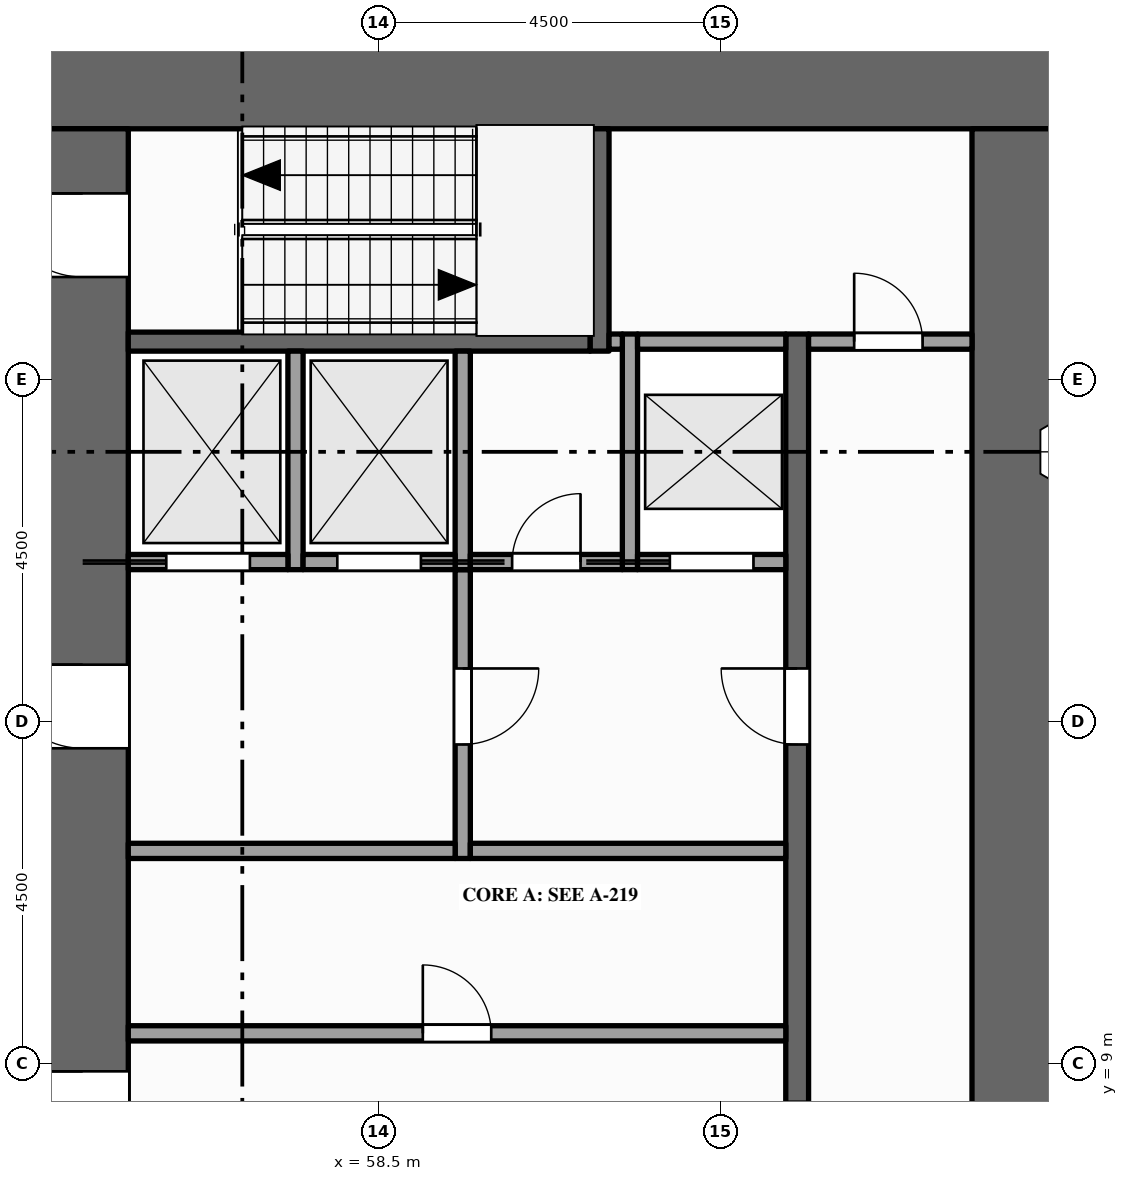
"""IFC4 building model, lengths in metres.
Left out: names, types, materials, properties, quantities, classifications, styles, units other than length and angle.
Written with IfcOpenShell. Run it as: python <this file> out.ifc"""

import sys

from ifc_helpers import new_model, si_unit, direction, frame, frame_2d, origin, place, context, subcontext, project, spatial, rectangle, extrude, element, fill, save


model = new_model("IFC4")
c1 = context("Model", 3, precision=1e-05, world=origin(), true_north=direction((0.0, 1.0)))
c2 = subcontext(c1, "Body", "Model", "MODEL_VIEW")
j1 = project(units=[si_unit("LENGTHUNIT", "METRE"), si_unit("PLANEANGLEUNIT", "RADIAN")], contexts=[c1])
p1 = place(None, origin())
s1 = spatial("IfcSite", under=j1, at=p1, CompositionType="ELEMENT")
p2 = place(p1, origin())
s2 = spatial("IfcBuilding", under=s1, at=p2, CompositionType="ELEMENT")
p3 = place(p2, frame((0.0, 0.0, 107.0)))
s3 = spatial("IfcBuildingStorey", under=s2, at=p3, CompositionType="ELEMENT", Elevation=107.0)
p4 = place(p3, frame((54.0, 21.9, -0.15), z_axis=(0.0, 0.0, 1.0), x_axis=(1.0, 0.0, 0.0)))
e1 = element("IfcWall", 1, at=p4, inside=s3, PredefinedType="SHEAR", context=c2, shape_type="SweptSolid", body=[
    extrude(rectangle(XDim=13.5, YDim=1.2, at=frame_2d((6.75, 0.0))), origin(), (0.0, 0.0, 1.0), 4.0),
])
p5 = place(p3, frame((54.6, 1.2, -0.15), z_axis=(0.0, 0.0, 1.0), x_axis=(0.0, 1.0, 0.0)))
e2 = element("IfcWall", 2, at=p5, inside=s3, PredefinedType="SHEAR", context=c2, shape_type="SweptSolid", body=[
    extrude(rectangle(XDim=20.1, YDim=1.2, at=frame_2d((10.05, 0.0))), origin(), (0.0, 0.0, 1.0), 4.0),
])
p6 = place(p5, frame((5.9, 0.0, 0.15)))
e3 = element("IfcOpeningElement", 3, at=p6, cuts=e2, PredefinedType="OPENING", context=c2, shape_type="SweptSolid", body=[
    extrude(rectangle(XDim=1.8, YDim=2.1, at=frame_2d((0.9, 1.05))), frame((0.0, 0.61, 0.0), z_axis=(0.0, -1.0, 0.0), x_axis=(1.0, 0.0, 0.0)), (0.0, 0.0, 1.0), 1.22),
])
p7 = place(p5, frame((11.95, 0.0, 0.15)))
e4 = element("IfcOpeningElement", 4, at=p7, cuts=e2, PredefinedType="OPENING", context=c2, shape_type="SweptSolid", body=[
    extrude(rectangle(XDim=1.1, YDim=2.1, at=frame_2d((0.55, 1.05))), frame((0.0, 0.61, 0.0), z_axis=(0.0, -1.0, 0.0), x_axis=(1.0, 0.0, 0.0)), (0.0, 0.0, 1.0), 1.22),
])
p8 = place(p5, frame((0.95, 0.0, 0.15)))
e5 = element("IfcOpeningElement", 5, at=p8, cuts=e2, PredefinedType="OPENING", context=c2, shape_type="SweptSolid", body=[
    extrude(rectangle(XDim=1.1, YDim=2.1, at=frame_2d((0.55, 1.05))), frame((0.0, 0.61, 0.0), z_axis=(0.0, -1.0, 0.0), x_axis=(1.0, 0.0, 0.0)), (0.0, 0.0, 1.0), 1.22),
])
p9 = place(p5, frame((18.15, 0.0, 0.15)))
e6 = element("IfcOpeningElement", 6, at=p9, cuts=e2, PredefinedType="OPENING", context=c2, shape_type="SweptSolid", body=[
    extrude(rectangle(XDim=1.1, YDim=2.1, at=frame_2d((0.55, 1.05))), frame((0.0, 0.61, 0.0), z_axis=(0.0, -1.0, 0.0), x_axis=(1.0, 0.0, 0.0)), (0.0, 0.0, 1.0), 1.22),
])
p10 = place(p3, frame((66.9, 1.2, -0.15), z_axis=(0.0, 0.0, 1.0), x_axis=(0.0, 1.0, 0.0)))
e7 = element("IfcWall", 7, at=p10, inside=s3, PredefinedType="SHEAR", context=c2, shape_type="SweptSolid", body=[
    extrude(rectangle(XDim=20.1, YDim=1.2, at=frame_2d((10.05, 0.0))), origin(), (0.0, 0.0, 1.0), 4.0),
])
p11 = place(p3, frame((57.4, 15.5, 0.0), z_axis=(0.0, 0.0, 1.0), x_axis=(0.0, 1.0, 0.0)))
e8 = element("IfcWall", 8, at=p11, inside=s3, PredefinedType="SOLIDWALL", context=c2, shape_type="SweptSolid", body=[
    extrude(rectangle(XDim=2.875, YDim=0.2, at=frame_2d((1.438, 0.0))), origin(), (0.0, 0.0, 1.0), 3.85),
])
p12 = place(p3, frame((59.6, 11.7, 0.0), z_axis=(0.0, 0.0, 1.0), x_axis=(0.0, 1.0, 0.0)))
e9 = element("IfcWall", 9, at=p12, inside=s3, PredefinedType="PARTITIONING", context=c2, shape_type="SweptSolid", body=[
    extrude(rectangle(XDim=3.8, YDim=0.2, at=frame_2d((1.9, 0.0))), origin(), (0.0, 0.0, 1.0), 3.85),
])
p13 = place(p12, frame((1.5, 0.0, 0.0)))
e10 = element("IfcOpeningElement", 10, at=p13, cuts=e9, PredefinedType="OPENING", context=c2, shape_type="SweptSolid", body=[
    extrude(rectangle(XDim=1.0, YDim=2.1, at=frame_2d((0.5, 1.05))), frame((0.0, 0.11, 0.0), z_axis=(0.0, -1.0, 0.0), x_axis=(1.0, 0.0, 0.0)), (0.0, 0.0, 1.0), 0.22),
])
p14 = place(p3, frame((59.6, 15.5, 0.0), z_axis=(0.0, 0.0, 1.0), x_axis=(0.0, 1.0, 0.0)))
e11 = element("IfcWall", 11, at=p14, inside=s3, PredefinedType="SOLIDWALL", context=c2, shape_type="SweptSolid", body=[
    extrude(rectangle(XDim=2.875, YDim=0.2, at=frame_2d((1.438, 0.0))), origin(), (0.0, 0.0, 1.0), 3.85),
])
p15 = place(p3, frame((61.4, 18.375, 0.0), z_axis=(0.0, 0.0, 1.0), x_axis=(0.0, 1.0, 0.0)))
e12 = element("IfcWall", 12, at=p15, inside=s3, PredefinedType="SHEAR", context=c2, shape_type="SweptSolid", body=[
    extrude(rectangle(XDim=2.925, YDim=0.25, at=frame_2d((1.462, 0.0))), origin(), (0.0, 0.0, 1.0), 3.85),
])
p16 = place(p3, frame((61.8, 15.5, 0.0), z_axis=(0.0, 0.0, 1.0), x_axis=(0.0, 1.0, 0.0)))
e13 = element("IfcWall", 13, at=p16, inside=s3, PredefinedType="SOLIDWALL", context=c2, shape_type="SweptSolid", body=[
    extrude(rectangle(XDim=3.1, YDim=0.2, at=frame_2d((1.55, 0.0))), origin(), (0.0, 0.0, 1.0), 3.85),
])
p17 = place(p3, frame((64.0, 4.1, 0.0), z_axis=(0.0, 0.0, 1.0), x_axis=(0.0, 1.0, 0.0)))
e14 = element("IfcWall", 14, at=p17, inside=s3, PredefinedType="SHEAR", context=c2, shape_type="SweptSolid", body=[
    extrude(rectangle(XDim=14.5, YDim=0.3, at=frame_2d((7.25, 0.0))), origin(), (0.0, 0.0, 1.0), 3.85),
])
p18 = place(p17, frame((3.4, 0.0, 0.0)))
e15 = element("IfcOpeningElement", 15, at=p18, cuts=e14, PredefinedType="OPENING", context=c2, shape_type="SweptSolid", body=[
    extrude(rectangle(XDim=1.0, YDim=2.1, at=frame_2d((0.5, 1.05))), frame((0.0, 0.16, 0.0), z_axis=(0.0, -1.0, 0.0), x_axis=(1.0, 0.0, 0.0)), (0.0, 0.0, 1.0), 0.32),
])
p19 = place(p17, frame((9.1, 0.0, 0.0)))
e16 = element("IfcOpeningElement", 16, at=p19, cuts=e14, PredefinedType="OPENING", context=c2, shape_type="SweptSolid", body=[
    extrude(rectangle(XDim=1.0, YDim=2.1, at=frame_2d((0.5, 1.05))), frame((0.0, 0.16, 0.0), z_axis=(0.0, -1.0, 0.0), x_axis=(1.0, 0.0, 0.0)), (0.0, 0.0, 1.0), 0.32),
])
p20 = place(p3, frame((55.2, 9.4, 0.0), z_axis=(0.0, 0.0, 1.0), x_axis=(1.0, 0.0, 0.0)))
e17 = element("IfcWall", 17, at=p20, inside=s3, PredefinedType="PARTITIONING", context=c2, shape_type="SweptSolid", body=[
    extrude(rectangle(XDim=8.65, YDim=0.2, at=frame_2d((4.325, 0.0))), origin(), (0.0, 0.0, 1.0), 3.85),
])
p21 = place(p20, frame((3.875, 0.0, 0.0)))
e18 = element("IfcOpeningElement", 18, at=p21, cuts=e17, PredefinedType="OPENING", context=c2, shape_type="SweptSolid", body=[
    extrude(rectangle(XDim=0.9, YDim=2.1, at=frame_2d((0.45, 1.05))), frame((0.0, 0.11, 0.0), z_axis=(0.0, -1.0, 0.0), x_axis=(1.0, 0.0, 0.0)), (0.0, 0.0, 1.0), 0.22),
])
p22 = place(p3, frame((55.2, 11.8, 0.0), z_axis=(0.0, 0.0, 1.0), x_axis=(1.0, 0.0, 0.0)))
e19 = element("IfcWall", 19, at=p22, inside=s3, PredefinedType="PARTITIONING", context=c2, shape_type="SweptSolid", body=[
    extrude(rectangle(XDim=4.3, YDim=0.2, at=frame_2d((2.15, 0.0))), origin(), (0.0, 0.0, 1.0), 3.85),
])
p23 = place(p3, frame((59.7, 11.8, 0.0), z_axis=(0.0, 0.0, 1.0), x_axis=(1.0, 0.0, 0.0)))
e20 = element("IfcWall", 20, at=p23, inside=s3, PredefinedType="PARTITIONING", context=c2, shape_type="SweptSolid", body=[
    extrude(rectangle(XDim=4.15, YDim=0.2, at=frame_2d((2.075, 0.0))), origin(), (0.0, 0.0, 1.0), 3.85),
])
p24 = place(p3, frame((55.2, 15.6, 0.0), z_axis=(0.0, 0.0, 1.0), x_axis=(1.0, 0.0, 0.0)))
e21 = element("IfcWall", 21, at=p24, inside=s3, PredefinedType="SOLIDWALL", context=c2, shape_type="SweptSolid", body=[
    extrude(rectangle(XDim=2.1, YDim=0.2, at=frame_2d((1.05, 0.0))), origin(), (0.0, 0.0, 1.0), 3.85),
])
p25 = place(p24, frame((0.5, 0.0, 0.012)))
e22 = element("IfcOpeningElement", 22, at=p25, cuts=e21, PredefinedType="OPENING", context=c2, shape_type="SweptSolid", body=[
    extrude(rectangle(XDim=1.1, YDim=2.1, at=frame_2d((0.55, 1.05))), frame((0.0, 0.11, 0.0), z_axis=(0.0, -1.0, 0.0), x_axis=(1.0, 0.0, 0.0)), (0.0, 0.0, 1.0), 0.22),
])
p26 = place(p3, frame((57.5, 15.6, 0.0), z_axis=(0.0, 0.0, 1.0), x_axis=(1.0, 0.0, 0.0)))
e23 = element("IfcWall", 23, at=p26, inside=s3, PredefinedType="SOLIDWALL", context=c2, shape_type="SweptSolid", body=[
    extrude(rectangle(XDim=2.0, YDim=0.2, at=frame_2d((1.0, 0.0))), origin(), (0.0, 0.0, 1.0), 3.85),
])
p27 = place(p26, frame((0.45, 0.0, 0.012)))
e24 = element("IfcOpeningElement", 24, at=p27, cuts=e23, PredefinedType="OPENING", context=c2, shape_type="SweptSolid", body=[
    extrude(rectangle(XDim=1.1, YDim=2.1, at=frame_2d((0.55, 1.05))), frame((0.0, 0.11, 0.0), z_axis=(0.0, -1.0, 0.0), x_axis=(1.0, 0.0, 0.0)), (0.0, 0.0, 1.0), 0.22),
])
p28 = place(p3, frame((59.7, 15.6, 0.0), z_axis=(0.0, 0.0, 1.0), x_axis=(1.0, 0.0, 0.0)))
e25 = element("IfcWall", 25, at=p28, inside=s3, PredefinedType="PARTITIONING", context=c2, shape_type="SweptSolid", body=[
    extrude(rectangle(XDim=2.0, YDim=0.2, at=frame_2d((1.0, 0.0))), origin(), (0.0, 0.0, 1.0), 3.85),
])
p29 = place(p28, frame((0.55, 0.0, 0.0)))
e26 = element("IfcOpeningElement", 26, at=p29, cuts=e25, PredefinedType="OPENING", context=c2, shape_type="SweptSolid", body=[
    extrude(rectangle(XDim=0.9, YDim=2.1, at=frame_2d((0.45, 1.05))), frame((0.0, 0.11, 0.0), z_axis=(0.0, -1.0, 0.0), x_axis=(1.0, 0.0, 0.0)), (0.0, 0.0, 1.0), 0.22),
])
p30 = place(p3, frame((61.9, 15.6, 0.0), z_axis=(0.0, 0.0, 1.0), x_axis=(1.0, 0.0, 0.0)))
e27 = element("IfcWall", 27, at=p30, inside=s3, PredefinedType="SOLIDWALL", context=c2, shape_type="SweptSolid", body=[
    extrude(rectangle(XDim=1.95, YDim=0.2, at=frame_2d((0.975, 0.0))), origin(), (0.0, 0.0, 1.0), 3.85),
])
p31 = place(p30, frame((0.425, 0.0, 0.012)))
e28 = element("IfcOpeningElement", 28, at=p31, cuts=e27, PredefinedType="OPENING", context=c2, shape_type="SweptSolid", body=[
    extrude(rectangle(XDim=1.1, YDim=2.1, at=frame_2d((0.55, 1.05))), frame((0.0, 0.11, 0.0), z_axis=(0.0, -1.0, 0.0), x_axis=(1.0, 0.0, 0.0)), (0.0, 0.0, 1.0), 0.22),
])
p32 = place(p3, frame((55.2, 18.5, 0.0), z_axis=(0.0, 0.0, 1.0), x_axis=(1.0, 0.0, 0.0)))
e29 = element("IfcWall", 29, at=p32, inside=s3, PredefinedType="SHEAR", context=c2, shape_type="SweptSolid", body=[
    extrude(rectangle(XDim=6.075, YDim=0.25, at=frame_2d((3.038, 0.0))), origin(), (0.0, 0.0, 1.0), 3.85),
])
p33 = place(p3, frame((61.525, 18.5, 0.0), z_axis=(0.0, 0.0, 1.0), x_axis=(1.0, 0.0, 0.0)))
e30 = element("IfcWall", 30, at=p33, inside=s3, PredefinedType="PARTITIONING", context=c2, shape_type="SweptSolid", body=[
    extrude(rectangle(XDim=0.175, YDim=0.2, at=frame_2d((0.087, 0.0))), origin(), (0.0, 0.0, 1.0), 3.85),
])
p34 = place(p3, frame((61.9, 18.5, 0.0), z_axis=(0.0, 0.0, 1.0), x_axis=(1.0, 0.0, 0.0)))
e31 = element("IfcWall", 31, at=p34, inside=s3, PredefinedType="SOLIDWALL", context=c2, shape_type="SweptSolid", body=[
    extrude(rectangle(XDim=1.95, YDim=0.2, at=frame_2d((0.975, 0.0))), origin(), (0.0, 0.0, 1.0), 3.85),
])
p35 = place(p3, frame((64.15, 18.5, 0.0), z_axis=(0.0, 0.0, 1.0), x_axis=(1.0, 0.0, 0.0)))
e32 = element("IfcWall", 32, at=p35, inside=s3, PredefinedType="PARTITIONING", context=c2, shape_type="SweptSolid", body=[
    extrude(rectangle(XDim=2.15, YDim=0.2, at=frame_2d((1.075, 0.0))), origin(), (0.0, 0.0, 1.0), 3.85),
])
p36 = place(p35, frame((0.6, 0.0, 0.0)))
e33 = element("IfcOpeningElement", 33, at=p36, cuts=e32, PredefinedType="OPENING", context=c2, shape_type="SweptSolid", body=[
    extrude(rectangle(XDim=0.9, YDim=2.1, at=frame_2d((0.45, 1.05))), frame((0.0, 0.11, 0.0), z_axis=(0.0, -1.0, 0.0), x_axis=(1.0, 0.0, 0.0)), (0.0, 0.0, 1.0), 0.22),
])
p37 = place(p25, origin())
e34 = element("IfcDoor", 34, at=p37, inside=s3, OperationType="SLIDING_TO_LEFT", PredefinedType="DOOR", context=c2, shape_type="SweptSolid", body=[
    extrude(rectangle(XDim=1.1, YDim=2.1, at=frame_2d((0.55, 1.05))), frame((0.0, 0.025, 0.0), z_axis=(0.0, -1.0, 0.0), x_axis=(1.0, 0.0, 0.0)), (0.0, 0.0, 1.0), 0.05),
])
fill(e22, e34)
p38 = place(p27, origin())
e35 = element("IfcDoor", 35, at=p38, inside=s3, OperationType="SLIDING_TO_RIGHT", PredefinedType="DOOR", context=c2, shape_type="SweptSolid", body=[
    extrude(rectangle(XDim=1.1, YDim=2.1, at=frame_2d((0.55, 1.05))), frame((0.0, 0.025, 0.0), z_axis=(0.0, -1.0, 0.0), x_axis=(1.0, 0.0, 0.0)), (0.0, 0.0, 1.0), 0.05),
])
fill(e24, e35)
p39 = place(p31, origin())
e36 = element("IfcDoor", 36, at=p39, inside=s3, OperationType="SLIDING_TO_LEFT", PredefinedType="DOOR", context=c2, shape_type="SweptSolid", body=[
    extrude(rectangle(XDim=1.1, YDim=2.1, at=frame_2d((0.55, 1.05))), frame((0.0, 0.025, 0.0), z_axis=(0.0, -1.0, 0.0), x_axis=(1.0, 0.0, 0.0)), (0.0, 0.0, 1.0), 0.05),
])
fill(e28, e36)
p40 = place(p6, origin())
e37 = element("IfcDoor", 37, at=p40, inside=s3, OperationType="DOUBLE_DOOR_SINGLE_SWING", PredefinedType="DOOR", context=c2, shape_type="SweptSolid", body=[
    extrude(rectangle(XDim=1.8, YDim=2.1, at=frame_2d((0.9, 1.05))), frame((0.0, 0.025, 0.0), z_axis=(0.0, -1.0, 0.0), x_axis=(1.0, 0.0, 0.0)), (0.0, 0.0, 1.0), 0.05),
])
fill(e3, e37)
p41 = place(p7, origin())
e38 = element("IfcDoor", 38, at=p41, inside=s3, OperationType="SINGLE_SWING_RIGHT", PredefinedType="DOOR", context=c2, shape_type="SweptSolid", body=[
    extrude(rectangle(XDim=1.1, YDim=2.1, at=frame_2d((0.55, 1.05))), frame((0.0, 0.025, 0.0), z_axis=(0.0, -1.0, 0.0), x_axis=(1.0, 0.0, 0.0)), (0.0, 0.0, 1.0), 0.05),
])
fill(e4, e38)
p42 = place(p13, origin())
e39 = element("IfcDoor", 39, at=p42, inside=s3, OperationType="SINGLE_SWING_RIGHT", PredefinedType="DOOR", context=c2, shape_type="SweptSolid", body=[
    extrude(rectangle(XDim=1.0, YDim=2.1, at=frame_2d((0.5, 1.05))), frame((0.0, 0.025, 0.0), z_axis=(0.0, -1.0, 0.0), x_axis=(1.0, 0.0, 0.0)), (0.0, 0.0, 1.0), 0.05),
])
fill(e10, e39)
p43 = place(p19, origin())
e40 = element("IfcDoor", 40, at=p43, inside=s3, OperationType="SINGLE_SWING_RIGHT", PredefinedType="DOOR", context=c2, shape_type="SweptSolid", body=[
    extrude(rectangle(XDim=1.0, YDim=2.1, at=frame_2d((0.5, 1.05))), frame((0.0, 0.025, 0.0), z_axis=(0.0, -1.0, 0.0), x_axis=(1.0, 0.0, 0.0)), (0.0, 0.0, 1.0), 0.05),
])
fill(e16, e40)
p44 = place(p9, origin())
e41 = element("IfcDoor", 41, at=p44, inside=s3, OperationType="SINGLE_SWING_RIGHT", PredefinedType="DOOR", context=c2, shape_type="SweptSolid", body=[
    extrude(rectangle(XDim=1.1, YDim=2.1, at=frame_2d((0.55, 1.05))), frame((0.0, 0.025, 0.0), z_axis=(0.0, -1.0, 0.0), x_axis=(1.0, 0.0, 0.0)), (0.0, 0.0, 1.0), 0.05),
])
fill(e6, e41)
p45 = place(p36, origin())
e42 = element("IfcDoor", 42, at=p45, inside=s3, OperationType="SINGLE_SWING_LEFT", PredefinedType="DOOR", context=c2, shape_type="SweptSolid", body=[
    extrude(rectangle(XDim=0.9, YDim=2.1, at=frame_2d((0.45, 1.05))), frame((0.0, 0.025, 0.0), z_axis=(0.0, -1.0, 0.0), x_axis=(1.0, 0.0, 0.0)), (0.0, 0.0, 1.0), 0.05),
])
fill(e33, e42)
p46 = place(p21, origin())
e43 = element("IfcDoor", 43, at=p46, inside=s3, OperationType="SINGLE_SWING_LEFT", PredefinedType="DOOR", context=c2, shape_type="SweptSolid", body=[
    extrude(rectangle(XDim=0.9, YDim=2.1, at=frame_2d((0.45, 1.05))), frame((0.0, 0.025, 0.0), z_axis=(0.0, -1.0, 0.0), x_axis=(1.0, 0.0, 0.0)), (0.0, 0.0, 1.0), 0.05),
])
fill(e18, e43)
p47 = place(p29, origin())
e44 = element("IfcDoor", 44, at=p47, inside=s3, OperationType="SINGLE_SWING_RIGHT", PredefinedType="DOOR", context=c2, shape_type="SweptSolid", body=[
    extrude(rectangle(XDim=0.9, YDim=2.1, at=frame_2d((0.45, 1.05))), frame((0.0, 0.025, 0.0), z_axis=(0.0, -1.0, 0.0), x_axis=(1.0, 0.0, 0.0)), (0.0, 0.0, 1.0), 0.05),
])
fill(e26, e44)
save(model, sys.argv[1])
